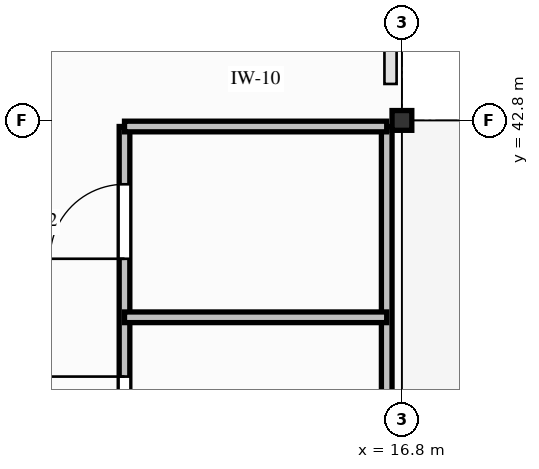
"""IFC4 building model, lengths in metres.
Left out: names, types, materials, properties, quantities, classifications, styles, units other than length and angle.
Written with IfcOpenShell. Run it as: python <this file> out.ifc"""

import sys

from ifc_helpers import new_model, si_unit, direction, frame, frame_2d, origin, origin_2d, place, context, subcontext, project, spatial, rectangle, i_section, extrude, element, fill, save


model = new_model("IFC4")
c1 = context("Model", 3, precision=1e-05, world=origin(), true_north=direction((0.0, 1.0)))
c2 = subcontext(c1, "Body", "Model", "MODEL_VIEW")
j1 = project(units=[si_unit("LENGTHUNIT", "METRE"), si_unit("PLANEANGLEUNIT", "RADIAN")], contexts=[c1])
p1 = place(None, origin())
s1 = spatial("IfcSite", under=j1, at=p1, CompositionType="ELEMENT")
p2 = place(p1, origin())
s2 = spatial("IfcBuilding", under=s1, at=p2, CompositionType="ELEMENT")
p3 = place(p2, frame((0.0, 0.0, 13.2)))
s3 = spatial("IfcBuildingStorey", under=s2, at=p3, CompositionType="ELEMENT", Elevation=13.2)
p4 = place(p3, frame((16.8, 42.8, 0.0), z_axis=(0.0, 0.0, 1.0), x_axis=(1.0, 0.0, 0.0)))
e1 = element("IfcColumn", 1, at=p4, inside=s3, PredefinedType="COLUMN", context=c2, shape_type="SweptSolid", body=[
    extrude(i_section(OverallWidth=0.26, OverallDepth=0.26, WebThickness=0.01, FlangeThickness=0.018, FilletRadius=0.024, at=origin_2d()), origin(), (0.0, 0.0, 1.0), 4.05),
])
p5 = place(p3, frame((13.15, 34.9, 0.0), z_axis=(0.0, 0.0, 1.0), x_axis=(0.0, 1.0, 0.0)))
e2 = element("IfcWall", 2, at=p5, inside=s3, PredefinedType="PARTITIONING", context=c2, shape_type="SweptSolid", body=[
    extrude(rectangle(XDim=7.82, YDim=0.14, at=frame_2d((3.91, 0.0))), origin(), (0.0, 0.0, 1.0), 3.478),
])
p6 = place(p5, frame((0.9, 0.0, 0.0)))
e3 = element("IfcOpeningElement", 3, at=p6, cuts=e2, PredefinedType="OPENING", context=c2, shape_type="SweptSolid", body=[
    extrude(rectangle(XDim=0.95, YDim=2.12, at=frame_2d((0.475, 1.06))), frame((0.0, 0.08, 0.0), z_axis=(0.0, -1.0, 0.0), x_axis=(1.0, 0.0, 0.0)), (0.0, 0.0, 1.0), 0.16),
])
p7 = place(p5, frame((3.55, 0.0, 0.0)))
e4 = element("IfcOpeningElement", 4, at=p7, cuts=e2, PredefinedType="OPENING", context=c2, shape_type="SweptSolid", body=[
    extrude(rectangle(XDim=0.98, YDim=2.14, at=frame_2d((0.49, 1.07))), frame((0.0, 0.08, 0.0), z_axis=(0.0, -1.0, 0.0), x_axis=(1.0, 0.0, 0.0)), (0.0, 0.0, 1.0), 0.16),
])
p8 = place(p5, frame((6.08, 0.0, 0.0)))
e5 = element("IfcOpeningElement", 5, at=p8, cuts=e2, PredefinedType="OPENING", context=c2, shape_type="SweptSolid", body=[
    extrude(rectangle(XDim=0.98, YDim=2.14, at=frame_2d((0.49, 1.07))), frame((0.0, 0.08, 0.0), z_axis=(0.0, -1.0, 0.0), x_axis=(1.0, 0.0, 0.0)), (0.0, 0.0, 1.0), 0.16),
])
p9 = place(p3, frame((16.6, 34.9, 0.0), z_axis=(0.0, 0.0, 1.0), x_axis=(0.0, 1.0, 0.0)))
e6 = element("IfcWall", 6, at=p9, inside=s3, PredefinedType="PARTITIONING", context=c2, shape_type="SweptSolid", body=[
    extrude(rectangle(XDim=7.82, YDim=0.14, at=frame_2d((3.91, 0.0))), origin(), (0.0, 0.0, 1.0), 3.228),
])
p10 = place(p3, frame((13.15, 42.72, 0.0), z_axis=(0.0, 0.0, 1.0), x_axis=(1.0, 0.0, 0.0)))
e7 = element("IfcWall", 7, at=p10, inside=s3, PredefinedType="PARTITIONING", context=c2, shape_type="SweptSolid", body=[
    extrude(rectangle(XDim=3.45, YDim=0.14, at=frame_2d((1.725, 0.0))), origin(), (0.0, 0.0, 1.0), 3.228),
])
p11 = place(p3, frame((13.15, 40.21, 0.0), z_axis=(0.0, 0.0, 1.0), x_axis=(1.0, 0.0, 0.0)))
e8 = element("IfcWall", 8, at=p11, inside=s3, PredefinedType="PARTITIONING", context=c2, shape_type="SweptSolid", body=[
    extrude(rectangle(XDim=3.45, YDim=0.14, at=frame_2d((1.725, 0.0))), origin(), (0.0, 0.0, 1.0), 3.478),
])
p12 = place(p7, origin())
e9 = element("IfcDoor", 9, at=p12, inside=s3, OperationType="SINGLE_SWING_RIGHT", PredefinedType="DOOR", context=c2, shape_type="SweptSolid", body=[
    extrude(rectangle(XDim=0.98, YDim=2.14, at=frame_2d((0.49, 1.07))), frame((0.0, 0.025, 0.0), z_axis=(0.0, -1.0, 0.0), x_axis=(1.0, 0.0, 0.0)), (0.0, 0.0, 1.0), 0.05),
])
fill(e4, e9)
p13 = place(p8, origin())
e10 = element("IfcDoor", 10, at=p13, inside=s3, OperationType="SINGLE_SWING_LEFT", PredefinedType="DOOR", context=c2, shape_type="SweptSolid", body=[
    extrude(rectangle(XDim=0.98, YDim=2.14, at=frame_2d((0.49, 1.07))), frame((0.0, 0.025, 0.0), z_axis=(0.0, -1.0, 0.0), x_axis=(1.0, 0.0, 0.0)), (0.0, 0.0, 1.0), 0.05),
])
fill(e5, e10)
save(model, sys.argv[1])
